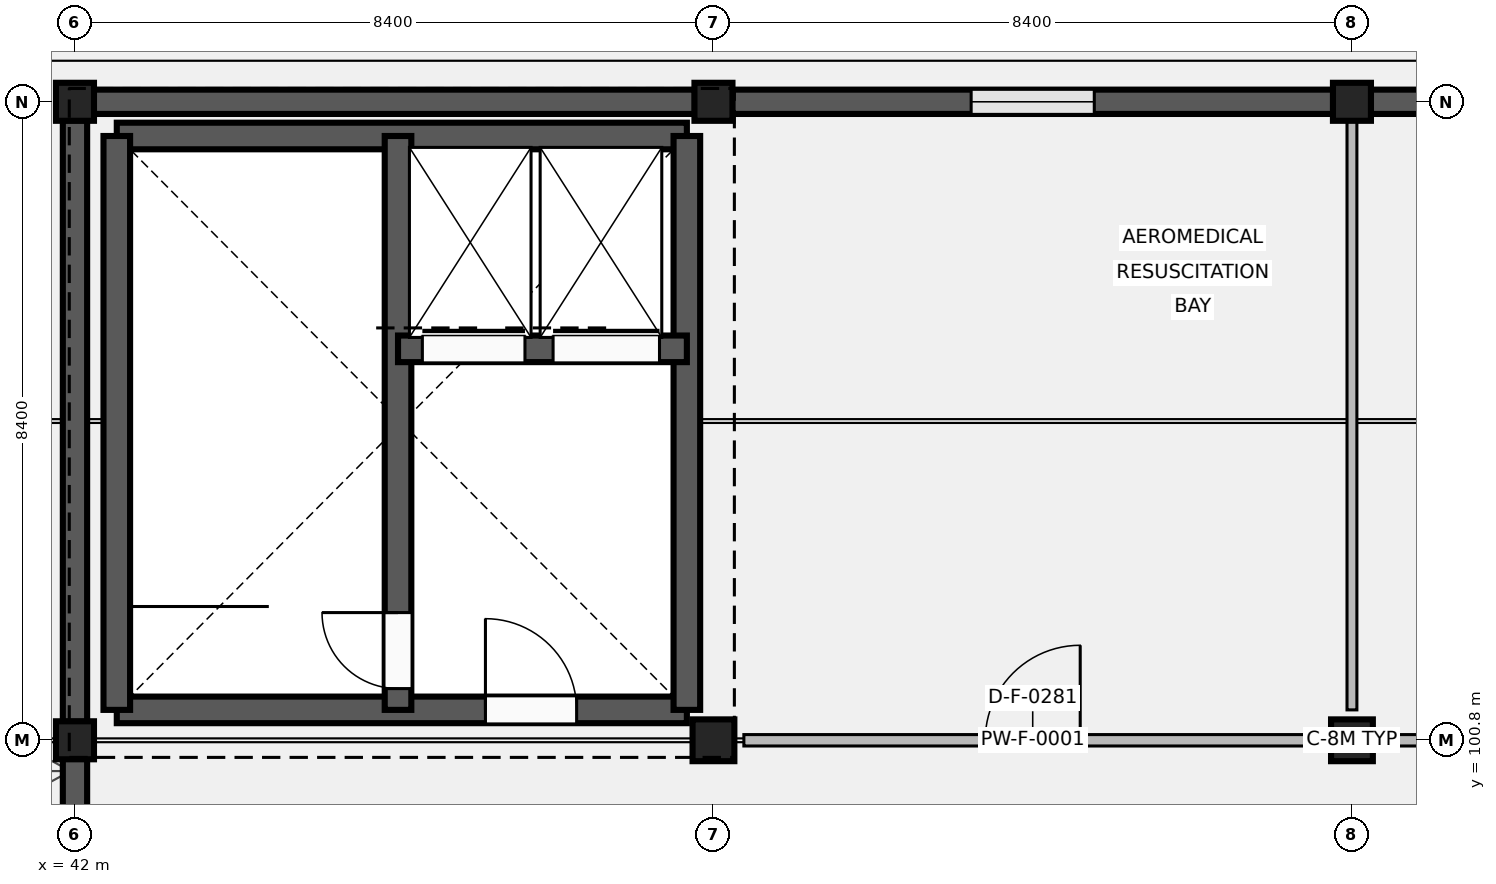
"""IFC4 building model, lengths in metres.
Left out: names, types, materials, properties, quantities, classifications, styles, units other than length and angle.
Written with IfcOpenShell. Run it as: python <this file> out.ifc"""

import sys

from ifc_helpers import new_model, si_unit, direction, frame, frame_2d, origin, origin_2d, place, context, subcontext, project, spatial, rectangle, extrude, element, fill, save


model = new_model("IFC4")
c1 = context("Model", 3, precision=1e-05, world=origin(), true_north=direction((0.0, 1.0)))
c2 = subcontext(c1, "Body", "Model", "MODEL_VIEW")
j1 = project(units=[si_unit("LENGTHUNIT", "METRE"), si_unit("PLANEANGLEUNIT", "RADIAN")], contexts=[c1])
p1 = place(None, origin())
s1 = spatial("IfcSite", under=j1, at=p1, CompositionType="ELEMENT")
p2 = place(p1, origin())
s2 = spatial("IfcBuilding", under=s1, at=p2, CompositionType="ELEMENT")
p3 = place(p2, frame((0.0, 0.0, 33.0)))
s3 = spatial("IfcBuildingStorey", under=s2, at=p3, CompositionType="ELEMENT", Elevation=33.0)
for number, where, z_axis, x_axis in (
    (1, (42.0, 100.8, 0.0), (0.0, 0.0, 1.0), (1.0, 0.0, 0.0)),
    (2, (42.0, 109.2, 0.0), (0.0, 0.0, 1.0), (1.0, 0.0, 0.0)),
):
    element("IfcColumn", number, at=place(p3, frame(where, z_axis=z_axis, x_axis=x_axis)), inside=s3, PredefinedType="COLUMN", context=c2, shape_type="SweptSolid", body=[
        extrude(rectangle(XDim=0.5, YDim=0.5, at=origin_2d()), origin(), (0.0, 0.0, 1.0), 3.6),
    ])
p4 = place(p3, frame((50.4, 100.8, 0.0), z_axis=(0.0, 0.0, 1.0), x_axis=(1.0, 0.0, 0.0)))
e3 = element("IfcColumn", 3, at=p4, inside=s3, PredefinedType="COLUMN", context=c2, shape_type="SweptSolid", body=[
    extrude(rectangle(XDim=0.55, YDim=0.55, at=origin_2d()), origin(), (0.0, 0.0, 1.0), 3.6),
])
p5 = place(p3, frame((50.4, 109.2, 0.0), z_axis=(0.0, 0.0, 1.0), x_axis=(1.0, 0.0, 0.0)))
e4 = element("IfcColumn", 4, at=p5, inside=s3, PredefinedType="COLUMN", context=c2, shape_type="SweptSolid", body=[
    extrude(rectangle(XDim=0.5, YDim=0.5, at=origin_2d()), origin(), (0.0, 0.0, 1.0), 3.6),
])
p6 = place(p3, frame((58.8, 100.8, 0.0), z_axis=(0.0, 0.0, 1.0), x_axis=(1.0, 0.0, 0.0)))
e5 = element("IfcColumn", 5, at=p6, inside=s3, PredefinedType="COLUMN", context=c2, shape_type="SweptSolid", body=[
    extrude(rectangle(XDim=0.55, YDim=0.55, at=origin_2d()), origin(), (0.0, 0.0, 1.0), 3.6),
])
p7 = place(p3, frame((58.8, 109.2, 0.0), z_axis=(0.0, 0.0, 1.0), x_axis=(1.0, 0.0, 0.0)))
e6 = element("IfcColumn", 6, at=p7, inside=s3, PredefinedType="COLUMN", context=c2, shape_type="SweptSolid", body=[
    extrude(rectangle(XDim=0.5, YDim=0.5, at=origin_2d()), origin(), (0.0, 0.0, 1.0), 3.6),
])
p8 = place(p3, frame((42.0, 92.645, 0.0), z_axis=(0.0, 0.0, 1.0), x_axis=(0.0, 1.0, 0.0)))
e7 = element("IfcWall", 7, at=p8, inside=s3, PredefinedType="SOLIDWALL", context=c2, shape_type="SweptSolid", body=[
    extrude(rectangle(XDim=7.91, YDim=0.32, at=frame_2d((3.955, 0.0))), origin(), (0.0, 0.0, 1.0), 2.9),
])
p9 = place(p8, frame((3.145, 0.0, 1.15)))
e8 = element("IfcOpeningElement", 8, at=p9, cuts=e7, PredefinedType="OPENING", context=c2, shape_type="SweptSolid", body=[
    extrude(rectangle(XDim=1.62, YDim=0.95, at=frame_2d((0.81, 0.475))), frame((0.0, 0.17, 0.0), z_axis=(0.0, -1.0, 0.0), x_axis=(1.0, 0.0, 0.0)), (0.0, 0.0, 1.0), 0.34),
])
p10 = place(p3, frame((42.245, 109.2, 0.0), z_axis=(0.0, 0.0, 1.0), x_axis=(1.0, 0.0, 0.0)))
e9 = element("IfcWall", 9, at=p10, inside=s3, PredefinedType="SOLIDWALL", context=c2, shape_type="SweptSolid", body=[
    extrude(rectangle(XDim=7.91, YDim=0.32, at=frame_2d((3.955, 0.0))), origin(), (0.0, 0.0, 1.0), 2.9),
])
p11 = place(p3, frame((42.0, 101.045, 0.0), z_axis=(0.0, 0.0, 1.0), x_axis=(0.0, 1.0, 0.0)))
e10 = element("IfcWall", 10, at=p11, inside=s3, PredefinedType="SOLIDWALL", context=c2, shape_type="SweptSolid", body=[
    extrude(rectangle(XDim=7.91, YDim=0.32, at=frame_2d((3.955, 0.0))), origin(), (0.0, 0.0, 1.0), 2.9),
])
p12 = place(p3, frame((50.645, 109.2, 0.0), z_axis=(0.0, 0.0, 1.0), x_axis=(1.0, 0.0, 0.0)))
e11 = element("IfcWall", 11, at=p12, inside=s3, PredefinedType="SOLIDWALL", context=c2, shape_type="SweptSolid", body=[
    extrude(rectangle(XDim=7.91, YDim=0.32, at=frame_2d((3.955, 0.0))), origin(), (0.0, 0.0, 1.0), 2.9),
])
p13 = place(p12, frame((3.145, 0.0, 1.15)))
e12 = element("IfcOpeningElement", 12, at=p13, cuts=e11, PredefinedType="OPENING", context=c2, shape_type="SweptSolid", body=[
    extrude(rectangle(XDim=1.62, YDim=0.95, at=frame_2d((0.81, 0.475))), frame((0.0, 0.17, 0.0), z_axis=(0.0, -1.0, 0.0), x_axis=(1.0, 0.0, 0.0)), (0.0, 0.0, 1.0), 0.34),
])
p14 = place(p3, frame((59.045, 109.2, 0.0), z_axis=(0.0, 0.0, 1.0), x_axis=(1.0, 0.0, 0.0)))
e13 = element("IfcWall", 13, at=p14, inside=s3, PredefinedType="SOLIDWALL", context=c2, shape_type="SweptSolid", body=[
    extrude(rectangle(XDim=7.91, YDim=0.32, at=frame_2d((3.955, 0.0))), origin(), (0.0, 0.0, 1.0), 2.9),
])
p15 = place(p14, frame((3.145, 0.0, 1.15)))
e14 = element("IfcOpeningElement", 14, at=p15, cuts=e13, PredefinedType="OPENING", context=c2, shape_type="SweptSolid", body=[
    extrude(rectangle(XDim=1.62, YDim=0.95, at=frame_2d((0.81, 0.475))), frame((0.0, 0.17, 0.0), z_axis=(0.0, -1.0, 0.0), x_axis=(1.0, 0.0, 0.0)), (0.0, 0.0, 1.0), 0.34),
])
p16 = place(p3, frame((42.55, 101.2, 0.0), z_axis=(0.0, 0.0, 1.0), x_axis=(1.0, 0.0, 0.0)))
e15 = element("IfcWall", 15, at=p16, inside=s3, PredefinedType="SHEAR", context=c2, shape_type="SweptSolid", body=[
    extrude(rectangle(XDim=7.5, YDim=0.35, at=frame_2d((3.75, 0.0))), origin(), (0.0, 0.0, 1.0), 3.38),
])
p17 = place(p16, frame((4.85, 0.0, 0.0)))
e16 = element("IfcOpeningElement", 16, at=p17, cuts=e15, PredefinedType="OPENING", context=c2, shape_type="SweptSolid", body=[
    extrude(rectangle(XDim=1.2, YDim=2.2, at=frame_2d((0.6, 1.1))), frame((0.0, 0.185, 0.0), z_axis=(0.0, -1.0, 0.0), x_axis=(1.0, 0.0, 0.0)), (0.0, 0.0, 1.0), 0.37),
])
p18 = place(p3, frame((42.55, 108.75, 0.0), z_axis=(0.0, 0.0, 1.0), x_axis=(1.0, 0.0, 0.0)))
e17 = element("IfcWall", 17, at=p18, inside=s3, PredefinedType="SHEAR", context=c2, shape_type="SweptSolid", body=[
    extrude(rectangle(XDim=7.5, YDim=0.35, at=frame_2d((3.75, 0.0))), origin(), (0.0, 0.0, 1.0), 3.38),
])
for number, where, z_axis, x_axis in (
    (18, (42.55, 101.2, 0.0), (0.0, 0.0, 1.0), (0.0, 1.0, 0.0)),
    (19, (50.05, 101.2, 0.0), (0.0, 0.0, 1.0), (0.0, 1.0, 0.0)),
):
    element("IfcWall", number, at=place(p3, frame(where, z_axis=z_axis, x_axis=x_axis)), inside=s3, PredefinedType="SHEAR", context=c2, shape_type="SweptSolid", body=[
        extrude(rectangle(XDim=7.55, YDim=0.35, at=frame_2d((3.775, 0.0))), origin(), (0.0, 0.0, 1.0), 3.38),
    ])
p19 = place(p3, frame((46.25, 101.2, 0.0), z_axis=(0.0, 0.0, 1.0), x_axis=(0.0, 1.0, 0.0)))
e20 = element("IfcWall", 20, at=p19, inside=s3, PredefinedType="SHEAR", context=c2, shape_type="SweptSolid", body=[
    extrude(rectangle(XDim=7.55, YDim=0.35, at=frame_2d((3.775, 0.0))), origin(), (0.0, 0.0, 1.0), 3.38),
])
p20 = place(p19, frame((0.28, 0.0, 0.0)))
e21 = element("IfcOpeningElement", 21, at=p20, cuts=e20, PredefinedType="OPENING", context=c2, shape_type="SweptSolid", body=[
    extrude(rectangle(XDim=1.0, YDim=2.15, at=frame_2d((0.5, 1.075))), frame((0.0, 0.185, 0.0), z_axis=(0.0, -1.0, 0.0), x_axis=(1.0, 0.0, 0.0)), (0.0, 0.0, 1.0), 0.37),
])
p21 = place(p3, frame((46.25, 105.95, 0.0), z_axis=(0.0, 0.0, 1.0), x_axis=(1.0, 0.0, 0.0)))
e22 = element("IfcWall", 22, at=p21, inside=s3, PredefinedType="SHEAR", context=c2, shape_type="SweptSolid", body=[
    extrude(rectangle(XDim=3.8, YDim=0.35, at=frame_2d((1.9, 0.0))), origin(), (0.0, 0.0, 1.0), 3.38),
])
p22 = place(p21, frame((0.32, 0.0, 0.0)))
e23 = element("IfcOpeningElement", 23, at=p22, cuts=e22, PredefinedType="OPENING", context=c2, shape_type="SweptSolid", body=[
    extrude(rectangle(XDim=1.35, YDim=2.25, at=frame_2d((0.675, 1.125))), frame((0.0, 0.185, 0.0), z_axis=(0.0, -1.0, 0.0), x_axis=(1.0, 0.0, 0.0)), (0.0, 0.0, 1.0), 0.37),
])
p23 = place(p21, frame((2.04, 0.0, 0.0)))
e24 = element("IfcOpeningElement", 24, at=p23, cuts=e22, PredefinedType="OPENING", context=c2, shape_type="SweptSolid", body=[
    extrude(rectangle(XDim=1.4, YDim=2.25, at=frame_2d((0.7, 1.125))), frame((0.0, 0.185, 0.0), z_axis=(0.0, -1.0, 0.0), x_axis=(1.0, 0.0, 0.0)), (0.0, 0.0, 1.0), 0.37),
])
p24 = place(p3, frame((50.8, 100.8, 0.0), z_axis=(0.0, 0.0, 1.0), x_axis=(1.0, 0.0, 0.0)))
e25 = element("IfcWall", 25, at=p24, inside=s3, PredefinedType="PARTITIONING", context=c2, shape_type="SweptSolid", body=[
    extrude(rectangle(XDim=7.6, YDim=0.15, at=frame_2d((3.8, 0.0))), origin(), (0.0, 0.0, 1.0), 2.88),
])
p25 = place(p24, frame((3.175, 0.0, 0.0)))
e26 = element("IfcOpeningElement", 26, at=p25, cuts=e25, PredefinedType="OPENING", context=c2, shape_type="SweptSolid", body=[
    extrude(rectangle(XDim=1.25, YDim=2.2, at=frame_2d((0.625, 1.1))), frame((0.0, 0.085, 0.0), z_axis=(0.0, -1.0, 0.0), x_axis=(1.0, 0.0, 0.0)), (0.0, 0.0, 1.0), 0.17),
])
p26 = place(p3, frame((59.2, 100.8, 0.0), z_axis=(0.0, 0.0, 1.0), x_axis=(1.0, 0.0, 0.0)))
e27 = element("IfcWall", 27, at=p26, inside=s3, PredefinedType="PARTITIONING", context=c2, shape_type="SweptSolid", body=[
    extrude(rectangle(XDim=7.6, YDim=0.15, at=frame_2d((3.8, 0.0))), origin(), (0.0, 0.0, 1.0), 2.88),
])
p27 = place(p26, frame((3.275, 0.0, 0.0)))
e28 = element("IfcOpeningElement", 28, at=p27, cuts=e27, PredefinedType="OPENING", context=c2, shape_type="SweptSolid", body=[
    extrude(rectangle(XDim=1.05, YDim=2.2, at=frame_2d((0.525, 1.1))), frame((0.0, 0.085, 0.0), z_axis=(0.0, -1.0, 0.0), x_axis=(1.0, 0.0, 0.0)), (0.0, 0.0, 1.0), 0.17),
])
p28 = place(p3, frame((58.8, 101.2, 0.0), z_axis=(0.0, 0.0, 1.0), x_axis=(0.0, 1.0, 0.0)))
e29 = element("IfcWall", 29, at=p28, inside=s3, PredefinedType="PARTITIONING", context=c2, shape_type="SweptSolid", body=[
    extrude(rectangle(XDim=7.84, YDim=0.13, at=frame_2d((3.92, 0.0))), origin(), (0.0, 0.0, 1.0), 2.88),
])
p29 = place(p13, origin())
e30 = element("IfcWindow", 30, at=p29, inside=s3, PartitioningType="SINGLE_PANEL", PredefinedType="WINDOW", context=c2, shape_type="SweptSolid", body=[
    extrude(rectangle(XDim=1.62, YDim=0.95, at=frame_2d((0.81, 0.475))), frame((0.0, 0.03, 0.0), z_axis=(0.0, -1.0, 0.0), x_axis=(1.0, 0.0, 0.0)), (0.0, 0.0, 1.0), 0.06),
])
fill(e12, e30)
p30 = place(p17, origin())
e31 = element("IfcDoor", 31, at=p30, inside=s3, OperationType="SINGLE_SWING_LEFT", PredefinedType="DOOR", context=c2, shape_type="SweptSolid", body=[
    extrude(rectangle(XDim=1.2, YDim=2.2, at=frame_2d((0.6, 1.1))), frame((0.0, 0.025, 0.0), z_axis=(0.0, -1.0, 0.0), x_axis=(1.0, 0.0, 0.0)), (0.0, 0.0, 1.0), 0.05),
])
fill(e16, e31)
p31 = place(p20, origin())
e32 = element("IfcDoor", 32, at=p31, inside=s3, OperationType="SINGLE_SWING_RIGHT", PredefinedType="DOOR", context=c2, shape_type="SweptSolid", body=[
    extrude(rectangle(XDim=1.0, YDim=2.15, at=frame_2d((0.5, 1.075))), frame((0.0, 0.025, 0.0), z_axis=(0.0, -1.0, 0.0), x_axis=(1.0, 0.0, 0.0)), (0.0, 0.0, 1.0), 0.05),
])
fill(e21, e32)
p32 = place(p22, origin())
e33 = element("IfcDoor", 33, at=p32, inside=s3, OperationType="SLIDING_TO_LEFT", PredefinedType="DOOR", context=c2, shape_type="SweptSolid", body=[
    extrude(rectangle(XDim=1.35, YDim=2.25, at=frame_2d((0.675, 1.125))), frame((0.0, 0.025, 0.0), z_axis=(0.0, -1.0, 0.0), x_axis=(1.0, 0.0, 0.0)), (0.0, 0.0, 1.0), 0.05),
])
fill(e23, e33)
p33 = place(p23, origin())
e34 = element("IfcDoor", 34, at=p33, inside=s3, OperationType="SLIDING_TO_LEFT", PredefinedType="DOOR", context=c2, shape_type="SweptSolid", body=[
    extrude(rectangle(XDim=1.4, YDim=2.25, at=frame_2d((0.7, 1.125))), frame((0.0, 0.025, 0.0), z_axis=(0.0, -1.0, 0.0), x_axis=(1.0, 0.0, 0.0)), (0.0, 0.0, 1.0), 0.05),
])
fill(e24, e34)
p34 = place(p25, origin())
e35 = element("IfcDoor", 35, at=p34, inside=s3, OperationType="SINGLE_SWING_RIGHT", PredefinedType="DOOR", context=c2, shape_type="SweptSolid", body=[
    extrude(rectangle(XDim=1.25, YDim=2.2, at=frame_2d((0.625, 1.1))), frame((0.0, 0.025, 0.0), z_axis=(0.0, -1.0, 0.0), x_axis=(1.0, 0.0, 0.0)), (0.0, 0.0, 1.0), 0.05),
])
fill(e26, e35)
save(model, sys.argv[1])
